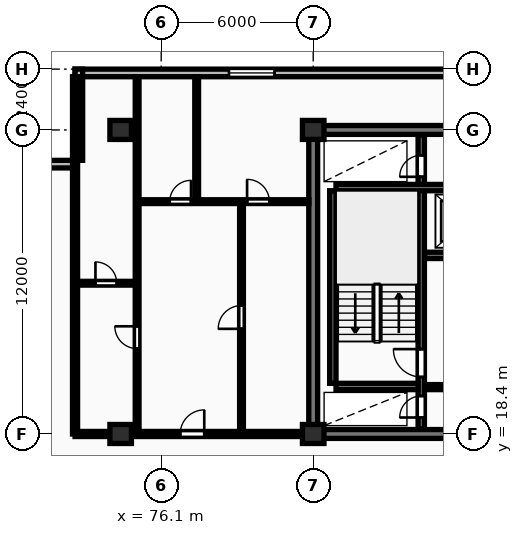
"""IFC4 building model, lengths in metres.
Left out: names, types, materials, properties, quantities, classifications, styles, units other than length and angle.
Written with IfcOpenShell. Run it as: python <this file> out.ifc"""

import sys

from ifc_helpers import new_model, si_unit, direction, frame, frame_2d, origin, origin_2d, place, context, subcontext, project, spatial, rectangle, extrude, element, fill, save


model = new_model("IFC4")
c1 = context("Model", 3, precision=1e-05, world=origin(), true_north=direction((0.0, 1.0)))
c2 = subcontext(c1, "Body", "Model", "MODEL_VIEW")
j1 = project(units=[si_unit("LENGTHUNIT", "METRE"), si_unit("PLANEANGLEUNIT", "RADIAN")], contexts=[c1])
p1 = place(None, origin())
s1 = spatial("IfcSite", under=j1, at=p1, CompositionType="ELEMENT")
p2 = place(p1, origin())
s2 = spatial("IfcBuilding", under=s1, at=p2, CompositionType="ELEMENT")
p3 = place(p2, frame((0.0, 0.0, 126.3)))
s3 = spatial("IfcBuildingStorey", under=s2, at=p3, CompositionType="ELEMENT", Elevation=126.3)
for number, where, z_axis, x_axis in (
    (1, (74.5, 18.4, 0.0), (0.0, 0.0, 1.0), (1.0, 0.0, 0.0)),
    (2, (74.5, 30.4, 0.0), (0.0, 0.0, 1.0), (1.0, 0.0, 0.0)),
    (3, (82.1, 18.4, 0.0), (0.0, 0.0, 1.0), (1.0, 0.0, 0.0)),
    (4, (82.1, 30.4, 0.0), (0.0, 0.0, 1.0), (1.0, 0.0, 0.0)),
):
    element("IfcColumn", number, at=place(p3, frame(where, z_axis=z_axis, x_axis=x_axis)), inside=s3, PredefinedType="COLUMN", context=c2, shape_type="SweptSolid", body=[
        extrude(rectangle(XDim=0.85, YDim=0.75, at=origin_2d()), origin(), (0.0, 0.0, 1.0), 3.25),
    ])
p4 = place(p3, frame((130.7, 32.65, 0.0), z_axis=(0.0, 0.0, 1.0), x_axis=(-1.0, 0.0, 0.0)))
e5 = element("IfcWall", 5, at=p4, inside=s3, PredefinedType="STANDARD", context=c2, shape_type="SweptSolid", body=[
    extrude(rectangle(XDim=58.0, YDim=0.3, at=frame_2d((29.0, 0.0))), origin(), (0.0, 0.0, 1.0), 2.97),
])
p5 = place(p4, frame((50.125, 0.0, 0.85)))
e6 = element("IfcOpeningElement", 6, at=p5, cuts=e5, PredefinedType="OPENING", context=c2, shape_type="SweptSolid", body=[
    extrude(rectangle(XDim=1.8, YDim=1.8, at=frame_2d((0.9, 0.9))), frame((0.0, 0.16, 0.0), z_axis=(0.0, -1.0, 0.0), x_axis=(1.0, 0.0, 0.0)), (0.0, 0.0, 1.0), 0.32),
])
p6 = place(p4, frame((6.775, 0.0, 0.85)))
e7 = element("IfcOpeningElement", 7, at=p6, cuts=e5, PredefinedType="OPENING", context=c2, shape_type="SweptSolid", body=[
    extrude(rectangle(XDim=1.8, YDim=1.8, at=frame_2d((0.9, 0.9))), frame((0.0, 0.16, 0.0), z_axis=(0.0, -1.0, 0.0), x_axis=(1.0, 0.0, 0.0)), (0.0, 0.0, 1.0), 0.32),
])
p7 = place(p3, frame((72.85, 32.8, 0.0), z_axis=(0.0, 0.0, 1.0), x_axis=(0.0, -1.0, 0.0)))
e8 = element("IfcWall", 8, at=p7, inside=s3, PredefinedType="STANDARD", context=c2, shape_type="SweptSolid", body=[
    extrude(rectangle(XDim=3.6, YDim=0.3, at=frame_2d((1.8, 0.0))), origin(), (0.0, 0.0, 1.0), 2.97),
])
p8 = place(p3, frame((72.7, 29.05, 0.0), z_axis=(0.0, 0.0, 1.0), x_axis=(-1.0, 0.0, 0.0)))
e9 = element("IfcWall", 9, at=p8, inside=s3, PredefinedType="STANDARD", context=c2, shape_type="SweptSolid", body=[
    extrude(rectangle(XDim=3.6, YDim=0.3, at=frame_2d((1.8, 0.0))), origin(), (0.0, 0.0, 1.0), 2.97),
])
p9 = place(p3, frame((81.925, 30.4, 0.0), z_axis=(0.0, 0.0, 1.0), x_axis=(1.0, 0.0, 0.0)))
e10 = element("IfcWall", 10, at=p9, inside=s3, PredefinedType="SHEAR", context=c2, shape_type="SweptSolid", body=[
    extrude(rectangle(XDim=36.265, YDim=0.35, at=frame_2d((18.132, 0.0))), origin(), (0.0, 0.0, 1.0), 3.25),
])
p10 = place(p3, frame((82.1, 18.575, 0.0), z_axis=(0.0, 0.0, 1.0), x_axis=(0.0, 1.0, 0.0)))
e11 = element("IfcWall", 11, at=p10, inside=s3, PredefinedType="SHEAR", context=c2, shape_type="SweptSolid", body=[
    extrude(rectangle(XDim=11.65, YDim=0.35, at=frame_2d((5.825, 0.0))), origin(), (0.0, 0.0, 1.0), 3.25),
])
p11 = place(p3, frame((81.925, 18.4, 0.0), z_axis=(0.0, 0.0, 1.0), x_axis=(1.0, 0.0, 0.0)))
e12 = element("IfcWall", 12, at=p11, inside=s3, PredefinedType="SHEAR", context=c2, shape_type="SweptSolid", body=[
    extrude(rectangle(XDim=36.265, YDim=0.35, at=frame_2d((18.132, 0.0))), origin(), (0.0, 0.0, 1.0), 3.25),
])
p12 = place(p11, frame((5.675, 0.0, 0.0)))
e13 = element("IfcOpeningElement", 13, at=p12, cuts=e12, PredefinedType="OPENING", context=c2, shape_type="SweptSolid", body=[
    extrude(rectangle(XDim=1.0, YDim=2.15, at=frame_2d((0.5, 1.075))), frame((0.0, 0.185, 0.0), z_axis=(0.0, -1.0, 0.0), x_axis=(1.0, 0.0, 0.0)), (0.0, 0.0, 1.0), 0.37),
])
p13 = place(p11, frame((21.925, 0.0, 0.0)))
e14 = element("IfcOpeningElement", 14, at=p13, cuts=e12, PredefinedType="OPENING", context=c2, shape_type="SweptSolid", body=[
    extrude(rectangle(XDim=1.5, YDim=2.2, at=frame_2d((0.75, 1.1))), frame((0.0, 0.185, 0.0), z_axis=(0.0, -1.0, 0.0), x_axis=(1.0, 0.0, 0.0)), (0.0, 0.0, 1.0), 0.37),
])
p14 = place(p11, frame((29.875, 0.0, 0.0)))
e15 = element("IfcOpeningElement", 15, at=p14, cuts=e12, PredefinedType="OPENING", context=c2, shape_type="SweptSolid", body=[
    extrude(rectangle(XDim=1.0, YDim=2.15, at=frame_2d((0.5, 1.075))), frame((0.0, 0.185, 0.0), z_axis=(0.0, -1.0, 0.0), x_axis=(1.0, 0.0, 0.0)), (0.0, 0.0, 1.0), 0.37),
])
p15 = place(p3, frame((82.875, 20.4, 0.0), z_axis=(0.0, 0.0, 1.0), x_axis=(0.0, 1.0, 0.0)))
e16 = element("IfcWall", 16, at=p15, inside=s3, PredefinedType="SHEAR", context=c2, shape_type="SweptSolid", body=[
    extrude(rectangle(XDim=7.6, YDim=0.25, at=frame_2d((3.8, 0.0))), origin(), (0.0, 0.0, 1.0), 3.25),
])
p16 = place(p3, frame((86.365, 18.6, 0.0), z_axis=(0.0, 0.0, 1.0), x_axis=(0.0, 1.0, 0.0)))
e17 = element("IfcWall", 17, at=p16, inside=s3, PredefinedType="SHEAR", context=c2, shape_type="SweptSolid", body=[
    extrude(rectangle(XDim=11.6, YDim=0.25, at=frame_2d((5.8, 0.0))), origin(), (0.0, 0.0, 1.0), 3.25),
])
p17 = place(p16, frame((0.45, 0.0, 0.0)))
e18 = element("IfcOpeningElement", 18, at=p17, cuts=e17, PredefinedType="OPENING", context=c2, shape_type="SweptSolid", body=[
    extrude(rectangle(XDim=0.85, YDim=2.05, at=frame_2d((0.425, 1.025))), frame((0.0, 0.135, 0.0), z_axis=(0.0, -1.0, 0.0), x_axis=(1.0, 0.0, 0.0)), (0.0, 0.0, 1.0), 0.27),
])
p18 = place(p16, frame((2.05, 0.0, 0.0)))
e19 = element("IfcOpeningElement", 19, at=p18, cuts=e17, PredefinedType="OPENING", context=c2, shape_type="SweptSolid", body=[
    extrude(rectangle(XDim=1.1, YDim=2.1, at=frame_2d((0.55, 1.05))), frame((0.0, 0.135, 0.0), z_axis=(0.0, -1.0, 0.0), x_axis=(1.0, 0.0, 0.0)), (0.0, 0.0, 1.0), 0.27),
])
p19 = place(p16, frame((9.95, 0.0, 0.0)))
e20 = element("IfcOpeningElement", 20, at=p19, cuts=e17, PredefinedType="OPENING", context=c2, shape_type="SweptSolid", body=[
    extrude(rectangle(XDim=0.85, YDim=2.05, at=frame_2d((0.425, 1.025))), frame((0.0, 0.135, 0.0), z_axis=(0.0, -1.0, 0.0), x_axis=(1.0, 0.0, 0.0)), (0.0, 0.0, 1.0), 0.27),
])
p20 = place(p3, frame((83.0, 20.275, 0.0), z_axis=(0.0, 0.0, 1.0), x_axis=(1.0, 0.0, 0.0)))
e21 = element("IfcWall", 21, at=p20, inside=s3, PredefinedType="SHEAR", context=c2, shape_type="SweptSolid", body=[
    extrude(rectangle(XDim=3.24, YDim=0.25, at=frame_2d((1.62, 0.0))), origin(), (0.0, 0.0, 1.0), 3.25),
])
p21 = place(p3, frame((83.0, 28.125, 0.0), z_axis=(0.0, 0.0, 1.0), x_axis=(1.0, 0.0, 0.0)))
e22 = element("IfcWall", 22, at=p21, inside=s3, PredefinedType="SHEAR", context=c2, shape_type="SweptSolid", body=[
    extrude(rectangle(XDim=7.82, YDim=0.25, at=frame_2d((3.91, 0.0))), origin(), (0.0, 0.0, 1.0), 3.25),
])
p22 = place(p3, frame((86.5, 25.45, 0.0), z_axis=(0.0, 0.0, 1.0), x_axis=(1.0, 0.0, 0.0)))
e23 = element("IfcWall", 23, at=p22, inside=s3, PredefinedType="SHEAR", context=c2, shape_type="SweptSolid", body=[
    extrude(rectangle(XDim=4.32, YDim=0.25, at=frame_2d((2.16, 0.0))), origin(), (0.0, 0.0, 1.0), 3.25),
])
p23 = place(p22, frame((1.14, 0.0, 0.0)))
e24 = element("IfcOpeningElement", 24, at=p23, cuts=e23, PredefinedType="OPENING", context=c2, shape_type="SweptSolid", body=[
    extrude(rectangle(XDim=1.12, YDim=2.12, at=frame_2d((0.56, 1.06))), frame((0.0, 0.135, 0.0), z_axis=(0.0, -1.0, 0.0), x_axis=(1.0, 0.0, 0.0)), (0.0, 0.0, 1.0), 0.27),
])
p24 = place(p22, frame((3.25, 0.0, 0.0)))
e25 = element("IfcOpeningElement", 25, at=p24, cuts=e23, PredefinedType="OPENING", context=c2, shape_type="SweptSolid", body=[
    extrude(rectangle(XDim=0.85, YDim=2.05, at=frame_2d((0.425, 1.025))), frame((0.0, 0.135, 0.0), z_axis=(0.0, -1.0, 0.0), x_axis=(1.0, 0.0, 0.0)), (0.0, 0.0, 1.0), 0.27),
])
p25 = place(p3, frame((86.5, 20.25, 0.0), z_axis=(0.0, 0.0, 1.0), x_axis=(1.0, 0.0, 0.0)))
e26 = element("IfcWall", 26, at=p25, inside=s3, PredefinedType="PARTITIONING", context=c2, shape_type="SweptSolid", body=[
    extrude(rectangle(XDim=4.32, YDim=0.2, at=frame_2d((2.16, 0.0))), origin(), (0.0, 0.0, 1.0), 2.97),
])
p26 = place(p25, frame((1.4, 0.0, 0.0)))
e27 = element("IfcOpeningElement", 27, at=p26, cuts=e26, PredefinedType="OPENING", context=c2, shape_type="SweptSolid", body=[
    extrude(rectangle(XDim=1.1, YDim=2.1, at=frame_2d((0.55, 1.05))), frame((0.0, 0.11, 0.0), z_axis=(0.0, -1.0, 0.0), x_axis=(1.0, 0.0, 0.0)), (0.0, 0.0, 1.0), 0.22),
])
p27 = place(p3, frame((72.7, 18.4, 0.0), z_axis=(0.0, 0.0, 1.0), x_axis=(0.0, 1.0, 0.0)))
e28 = element("IfcWall", 28, at=p27, inside=s3, PredefinedType="PARTITIONING", context=c2, shape_type="SweptSolid", body=[
    extrude(rectangle(XDim=14.1, YDim=0.2, at=frame_2d((7.05, 0.0))), origin(), (0.0, 0.0, 1.0), 2.97),
])
p28 = place(p3, frame((72.7, 24.35, 0.0), z_axis=(0.0, 0.0, 1.0), x_axis=(1.0, 0.0, 0.0)))
e29 = element("IfcWall", 29, at=p28, inside=s3, PredefinedType="PARTITIONING", context=c2, shape_type="SweptSolid", body=[
    extrude(rectangle(XDim=2.45, YDim=0.15, at=frame_2d((1.225, 0.0))), origin(), (0.0, 0.0, 1.0), 2.97),
])
p29 = place(p28, frame((0.805, 0.0, 0.0)))
e30 = element("IfcOpeningElement", 30, at=p29, cuts=e29, PredefinedType="OPENING", context=c2, shape_type="SweptSolid", body=[
    extrude(rectangle(XDim=0.84, YDim=2.04, at=frame_2d((0.42, 1.02))), frame((0.0, 0.085, 0.0), z_axis=(0.0, -1.0, 0.0), x_axis=(1.0, 0.0, 0.0)), (0.0, 0.0, 1.0), 0.17),
])
p30 = place(p3, frame((75.15, 18.45, 0.0), z_axis=(0.0, 0.0, 1.0), x_axis=(0.0, 1.0, 0.0)))
e31 = element("IfcWall", 31, at=p30, inside=s3, PredefinedType="PARTITIONING", context=c2, shape_type="SweptSolid", body=[
    extrude(rectangle(XDim=14.05, YDim=0.15, at=frame_2d((7.025, 0.0))), origin(), (0.0, 0.0, 1.0), 2.97),
])
p31 = place(p30, frame((3.32, 0.0, 0.0)))
e32 = element("IfcOpeningElement", 32, at=p31, cuts=e31, PredefinedType="OPENING", context=c2, shape_type="SweptSolid", body=[
    extrude(rectangle(XDim=0.88, YDim=2.06, at=frame_2d((0.44, 1.03))), frame((0.0, 0.085, 0.0), z_axis=(0.0, -1.0, 0.0), x_axis=(1.0, 0.0, 0.0)), (0.0, 0.0, 1.0), 0.17),
])
p32 = place(p3, frame((79.27, 18.45, 0.0), z_axis=(0.0, 0.0, 1.0), x_axis=(0.0, 1.0, 0.0)))
e33 = element("IfcWall", 33, at=p32, inside=s3, PredefinedType="PARTITIONING", context=c2, shape_type="SweptSolid", body=[
    extrude(rectangle(XDim=9.12, YDim=0.15, at=frame_2d((4.56, 0.0))), origin(), (0.0, 0.0, 1.0), 2.97),
])
p33 = place(p32, frame((4.1, 0.0, 0.0)))
e34 = element("IfcOpeningElement", 34, at=p33, cuts=e33, PredefinedType="OPENING", context=c2, shape_type="SweptSolid", body=[
    extrude(rectangle(XDim=0.92, YDim=2.08, at=frame_2d((0.46, 1.04))), frame((0.0, 0.085, 0.0), z_axis=(0.0, -1.0, 0.0), x_axis=(1.0, 0.0, 0.0)), (0.0, 0.0, 1.0), 0.17),
])
p34 = place(p3, frame((77.5, 27.57, 0.0), z_axis=(0.0, 0.0, 1.0), x_axis=(0.0, 1.0, 0.0)))
e35 = element("IfcWall", 35, at=p34, inside=s3, PredefinedType="PARTITIONING", context=c2, shape_type="SweptSolid", body=[
    extrude(rectangle(XDim=4.93, YDim=0.15, at=frame_2d((2.465, 0.0))), origin(), (0.0, 0.0, 1.0), 2.97),
])
p35 = place(p3, frame((75.17, 27.57, 0.0), z_axis=(0.0, 0.0, 1.0), x_axis=(1.0, 0.0, 0.0)))
e36 = element("IfcWall", 36, at=p35, inside=s3, PredefinedType="PARTITIONING", context=c2, shape_type="SweptSolid", body=[
    extrude(rectangle(XDim=6.76, YDim=0.15, at=frame_2d((3.38, 0.0))), origin(), (0.0, 0.0, 1.0), 2.97),
])
p36 = place(p35, frame((1.266, 0.0, 0.0)))
e37 = element("IfcOpeningElement", 37, at=p36, cuts=e36, PredefinedType="OPENING", context=c2, shape_type="SweptSolid", body=[
    extrude(rectangle(XDim=0.84, YDim=2.04, at=frame_2d((0.42, 1.02))), frame((0.0, 0.085, 0.0), z_axis=(0.0, -1.0, 0.0), x_axis=(1.0, 0.0, 0.0)), (0.0, 0.0, 1.0), 0.17),
])
p37 = place(p35, frame((4.32, 0.0, 0.0)))
e38 = element("IfcOpeningElement", 38, at=p37, cuts=e36, PredefinedType="OPENING", context=c2, shape_type="SweptSolid", body=[
    extrude(rectangle(XDim=0.88, YDim=2.06, at=frame_2d((0.44, 1.03))), frame((0.0, 0.085, 0.0), z_axis=(0.0, -1.0, 0.0), x_axis=(1.0, 0.0, 0.0)), (0.0, 0.0, 1.0), 0.17),
])
p38 = place(p3, frame((72.7, 18.4, 0.0), z_axis=(0.0, 0.0, 1.0), x_axis=(1.0, 0.0, 0.0)))
e39 = element("IfcWall", 39, at=p38, inside=s3, PredefinedType="PARTITIONING", context=c2, shape_type="SweptSolid", body=[
    extrude(rectangle(XDim=9.25, YDim=0.2, at=frame_2d((4.625, 0.0))), origin(), (0.0, 0.0, 1.0), 2.358),
])
p39 = place(p38, frame((4.15, 0.0, 0.0)))
e40 = element("IfcOpeningElement", 40, at=p39, cuts=e39, PredefinedType="OPENING", context=c2, shape_type="SweptSolid", body=[
    extrude(rectangle(XDim=0.95, YDim=2.15, at=frame_2d((0.475, 1.075))), frame((0.0, 0.11, 0.0), z_axis=(0.0, -1.0, 0.0), x_axis=(1.0, 0.0, 0.0)), (0.0, 0.0, 1.0), 0.22),
])
p40 = place(p5, origin())
e41 = element("IfcWindow", 41, at=p40, inside=s3, PartitioningType="SINGLE_PANEL", PredefinedType="WINDOW", context=c2, shape_type="SweptSolid", body=[
    extrude(rectangle(XDim=1.8, YDim=1.8, at=frame_2d((0.9, 0.9))), frame((0.0, 0.03, 0.0), z_axis=(0.0, -1.0, 0.0), x_axis=(1.0, 0.0, 0.0)), (0.0, 0.0, 1.0), 0.06),
])
fill(e6, e41)
p41 = place(p17, origin())
e42 = element("IfcDoor", 42, at=p41, inside=s3, OperationType="SINGLE_SWING_LEFT", PredefinedType="DOOR", context=c2, shape_type="SweptSolid", body=[
    extrude(rectangle(XDim=0.85, YDim=2.05, at=frame_2d((0.425, 1.025))), frame((0.0, 0.025, 0.0), z_axis=(0.0, -1.0, 0.0), x_axis=(1.0, 0.0, 0.0)), (0.0, 0.0, 1.0), 0.05),
])
fill(e18, e42)
p42 = place(p18, origin())
e43 = element("IfcDoor", 43, at=p42, inside=s3, OperationType="SINGLE_SWING_RIGHT", PredefinedType="DOOR", context=c2, shape_type="SweptSolid", body=[
    extrude(rectangle(XDim=1.1, YDim=2.1, at=frame_2d((0.55, 1.05))), frame((0.0, 0.025, 0.0), z_axis=(0.0, -1.0, 0.0), x_axis=(1.0, 0.0, 0.0)), (0.0, 0.0, 1.0), 0.05),
])
fill(e19, e43)
p43 = place(p19, origin())
e44 = element("IfcDoor", 44, at=p43, inside=s3, OperationType="SINGLE_SWING_LEFT", PredefinedType="DOOR", context=c2, shape_type="SweptSolid", body=[
    extrude(rectangle(XDim=0.85, YDim=2.05, at=frame_2d((0.425, 1.025))), frame((0.0, 0.025, 0.0), z_axis=(0.0, -1.0, 0.0), x_axis=(1.0, 0.0, 0.0)), (0.0, 0.0, 1.0), 0.05),
])
fill(e20, e44)
p44 = place(p29, origin())
e45 = element("IfcDoor", 45, at=p44, inside=s3, OperationType="SINGLE_SWING_LEFT", PredefinedType="DOOR", context=c2, shape_type="SweptSolid", body=[
    extrude(rectangle(XDim=0.84, YDim=2.04, at=frame_2d((0.42, 1.02))), frame((0.0, 0.025, 0.0), z_axis=(0.0, -1.0, 0.0), x_axis=(1.0, 0.0, 0.0)), (0.0, 0.0, 1.0), 0.05),
])
fill(e30, e45)
p45 = place(p31, origin())
e46 = element("IfcDoor", 46, at=p45, inside=s3, OperationType="SINGLE_SWING_RIGHT", PredefinedType="DOOR", context=c2, shape_type="SweptSolid", body=[
    extrude(rectangle(XDim=0.88, YDim=2.06, at=frame_2d((0.44, 1.03))), frame((0.0, 0.025, 0.0), z_axis=(0.0, -1.0, 0.0), x_axis=(1.0, 0.0, 0.0)), (0.0, 0.0, 1.0), 0.05),
])
fill(e32, e46)
p46 = place(p33, origin())
e47 = element("IfcDoor", 47, at=p46, inside=s3, OperationType="SINGLE_SWING_LEFT", PredefinedType="DOOR", context=c2, shape_type="SweptSolid", body=[
    extrude(rectangle(XDim=0.92, YDim=2.08, at=frame_2d((0.46, 1.04))), frame((0.0, 0.025, 0.0), z_axis=(0.0, -1.0, 0.0), x_axis=(1.0, 0.0, 0.0)), (0.0, 0.0, 1.0), 0.05),
])
fill(e34, e47)
p47 = place(p36, origin())
e48 = element("IfcDoor", 48, at=p47, inside=s3, OperationType="SINGLE_SWING_RIGHT", PredefinedType="DOOR", context=c2, shape_type="SweptSolid", body=[
    extrude(rectangle(XDim=0.84, YDim=2.04, at=frame_2d((0.42, 1.02))), frame((0.0, 0.025, 0.0), z_axis=(0.0, -1.0, 0.0), x_axis=(1.0, 0.0, 0.0)), (0.0, 0.0, 1.0), 0.05),
])
fill(e37, e48)
p48 = place(p37, origin())
e49 = element("IfcDoor", 49, at=p48, inside=s3, OperationType="SINGLE_SWING_LEFT", PredefinedType="DOOR", context=c2, shape_type="SweptSolid", body=[
    extrude(rectangle(XDim=0.88, YDim=2.06, at=frame_2d((0.44, 1.03))), frame((0.0, 0.025, 0.0), z_axis=(0.0, -1.0, 0.0), x_axis=(1.0, 0.0, 0.0)), (0.0, 0.0, 1.0), 0.05),
])
fill(e38, e49)
p49 = place(p39, origin())
e50 = element("IfcDoor", 50, at=p49, inside=s3, OperationType="SINGLE_SWING_RIGHT", PredefinedType="DOOR", context=c2, shape_type="SweptSolid", body=[
    extrude(rectangle(XDim=0.95, YDim=2.15, at=frame_2d((0.475, 1.075))), frame((0.0, 0.025, 0.0), z_axis=(0.0, -1.0, 0.0), x_axis=(1.0, 0.0, 0.0)), (0.0, 0.0, 1.0), 0.05),
])
fill(e40, e50)
save(model, sys.argv[1])
